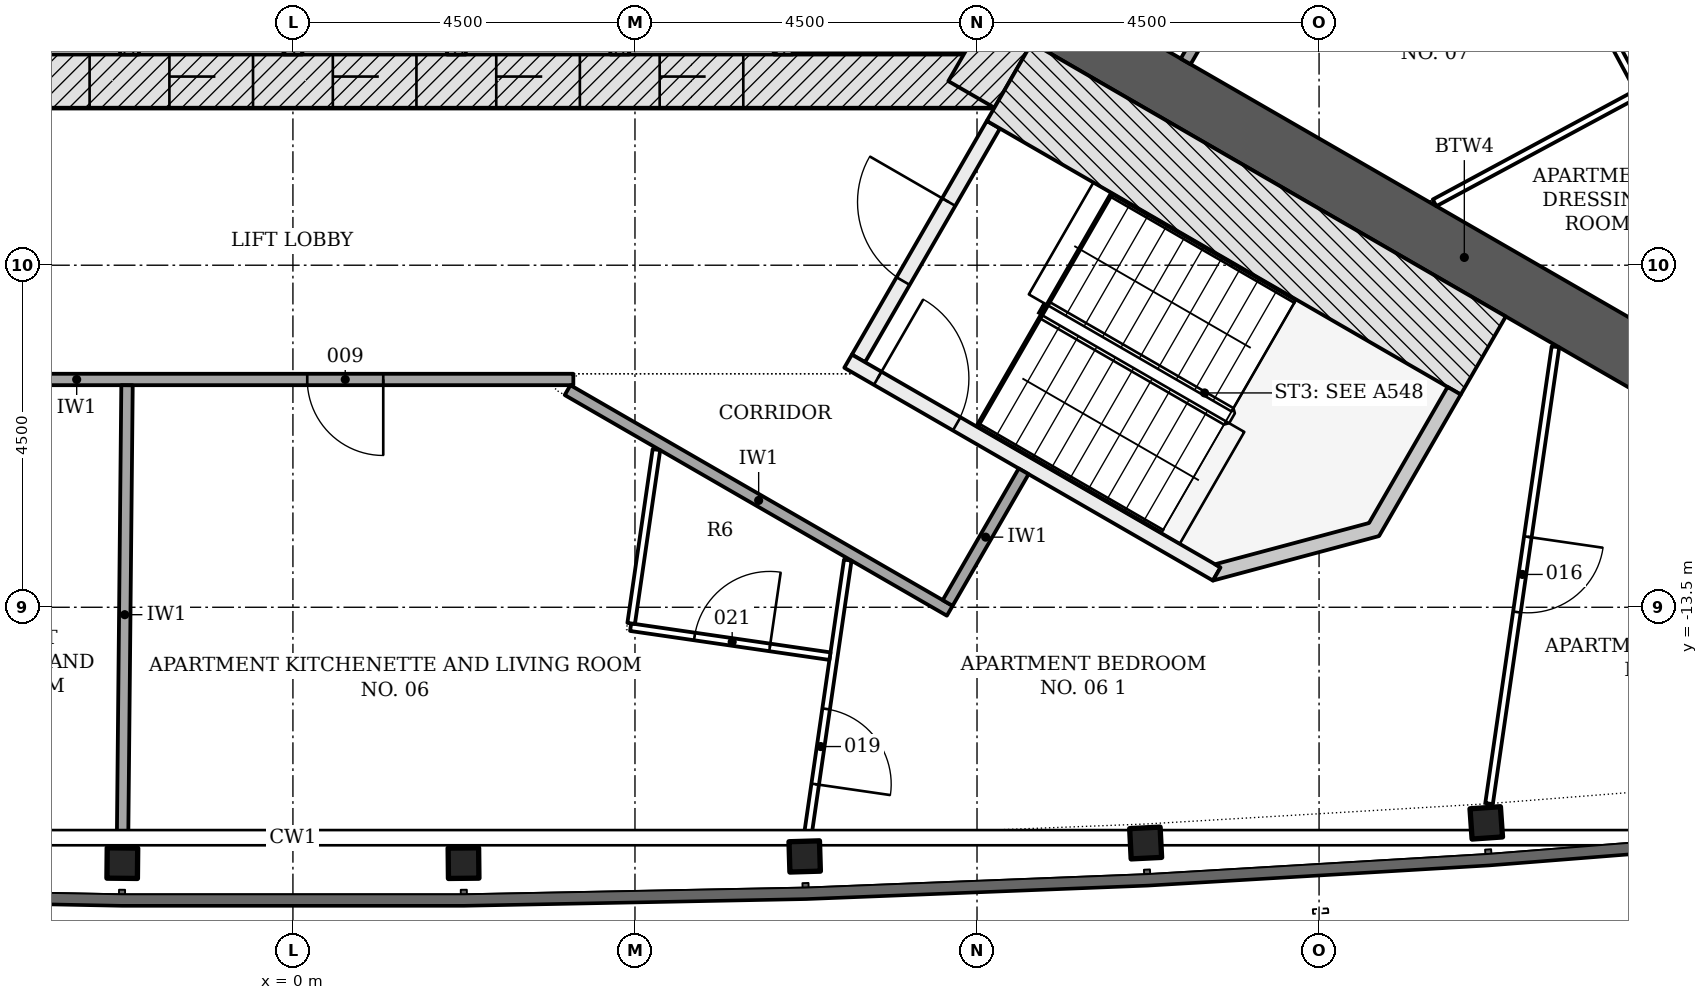
"""IFC4 building model, lengths in metres.
Left out: names, types, materials, properties, quantities, classifications, styles, units other than length and angle.
Written with IfcOpenShell. Run it as: python <this file> out.ifc"""

import sys

from ifc_helpers import new_model, si_unit, direction, frame, frame_2d, origin, origin_2d, place, context, subcontext, project, spatial, polyline, rectangle, i_section, outline, extrude, element, fill, save


model = new_model("IFC4")
c1 = context("Model", 3, precision=1e-05, world=origin(), true_north=direction((0.0, 1.0)))
c2 = subcontext(c1, "Body", "Model", "MODEL_VIEW")
j1 = project(units=[si_unit("LENGTHUNIT", "METRE"), si_unit("PLANEANGLEUNIT", "RADIAN")], contexts=[c1])
p1 = place(None, origin())
s1 = spatial("IfcSite", under=j1, at=p1, CompositionType="ELEMENT")
p2 = place(p1, origin())
s2 = spatial("IfcBuilding", under=s1, at=p2, CompositionType="ELEMENT")
p3 = place(p2, frame((0.0, 0.0, 98.7)))
s3 = spatial("IfcBuildingStorey", under=s2, at=p3, CompositionType="ELEMENT", Elevation=98.7)
p4 = place(p3, frame((-9.229, -6.578, -0.2), z_axis=(0.0, 0.0, 1.0), x_axis=(1.0, 0.0, 0.0)))
e1 = element("IfcWall", 1, at=p4, inside=s3, PredefinedType="SHEAR", context=c2, shape_type="SweptSolid", body=[
    extrude(rectangle(XDim=18.458, YDim=0.7, at=frame_2d((9.229, 0.0))), origin(), (0.0, 0.0, 1.0), 3.6),
])
p5 = place(p4, frame((3.304, 0.0, 0.2)))
e2 = element("IfcOpeningElement", 2, at=p5, cuts=e1, PredefinedType="OPENING", context=c2, shape_type="SweptSolid", body=[
    extrude(rectangle(XDim=1.1, YDim=2.1, at=frame_2d((0.55, 1.05))), frame((0.0, 0.36, 0.0), z_axis=(0.0, -1.0, 0.0), x_axis=(1.0, 0.0, 0.0)), (0.0, 0.0, 1.0), 0.72),
])
p6 = place(p4, frame((5.454, 0.0, 0.2)))
e3 = element("IfcOpeningElement", 3, at=p6, cuts=e1, PredefinedType="OPENING", context=c2, shape_type="SweptSolid", body=[
    extrude(rectangle(XDim=1.1, YDim=2.1, at=frame_2d((0.55, 1.05))), frame((0.0, 0.36, 0.0), z_axis=(0.0, -1.0, 0.0), x_axis=(1.0, 0.0, 0.0)), (0.0, 0.0, 1.0), 0.72),
])
p7 = place(p4, frame((7.604, 0.0, 0.2)))
e4 = element("IfcOpeningElement", 4, at=p7, cuts=e1, PredefinedType="OPENING", context=c2, shape_type="SweptSolid", body=[
    extrude(rectangle(XDim=1.1, YDim=2.1, at=frame_2d((0.55, 1.05))), frame((0.0, 0.36, 0.0), z_axis=(0.0, -1.0, 0.0), x_axis=(1.0, 0.0, 0.0)), (0.0, 0.0, 1.0), 0.72),
])
p8 = place(p4, frame((9.754, 0.0, 0.2)))
e5 = element("IfcOpeningElement", 5, at=p8, cuts=e1, PredefinedType="OPENING", context=c2, shape_type="SweptSolid", body=[
    extrude(rectangle(XDim=1.1, YDim=2.1, at=frame_2d((0.55, 1.05))), frame((0.0, 0.36, 0.0), z_axis=(0.0, -1.0, 0.0), x_axis=(1.0, 0.0, 0.0)), (0.0, 0.0, 1.0), 0.72),
])
p9 = place(p4, frame((11.904, 0.0, 0.2)))
e6 = element("IfcOpeningElement", 6, at=p9, cuts=e1, PredefinedType="OPENING", context=c2, shape_type="SweptSolid", body=[
    extrude(rectangle(XDim=1.1, YDim=2.1, at=frame_2d((0.55, 1.05))), frame((0.0, 0.36, 0.0), z_axis=(0.0, -1.0, 0.0), x_axis=(1.0, 0.0, 0.0)), (0.0, 0.0, 1.0), 0.72),
])
p10 = place(p4, frame((14.054, 0.0, 0.2)))
e7 = element("IfcOpeningElement", 7, at=p10, cuts=e1, PredefinedType="OPENING", context=c2, shape_type="SweptSolid", body=[
    extrude(rectangle(XDim=1.1, YDim=2.1, at=frame_2d((0.55, 1.05))), frame((0.0, 0.36, 0.0), z_axis=(0.0, -1.0, 0.0), x_axis=(1.0, 0.0, 0.0)), (0.0, 0.0, 1.0), 0.72),
])
p11 = place(p4, frame((1.079, 0.0, 0.2)))
e8 = element("IfcOpeningElement", 8, at=p11, cuts=e1, PredefinedType="OPENING", context=c2, shape_type="SweptSolid", body=[
    extrude(rectangle(XDim=0.9, YDim=2.1, at=frame_2d((0.45, 1.05))), frame((0.0, 0.36, 0.0), z_axis=(0.0, -1.0, 0.0), x_axis=(1.0, 0.0, 0.0)), (0.0, 0.0, 1.0), 0.72),
])
p12 = place(p3, frame((8.926, -6.753, -0.2), z_axis=(0.0, 0.0, 1.0), x_axis=(0.500042739161, 0.866000726912, 0.0)))
e9 = element("IfcWall", 9, at=p12, inside=s3, PredefinedType="SHEAR", context=c2, shape_type="SweptSolid", body=[
    extrude(rectangle(XDim=2.771, YDim=0.7, at=frame_2d((1.386, 0.0))), origin(), (0.0, 0.0, 1.0), 3.6),
])
p13 = place(p3, frame((9.922, -5.728, -0.2), z_axis=(0.0, 0.0, 1.0), x_axis=(0.866029086277, -0.499993621681, 0.0)))
e10 = element("IfcWall", 10, at=p13, inside=s3, PredefinedType="SHEAR", context=c2, shape_type="SweptSolid", body=[
    extrude(rectangle(XDim=12.677, YDim=0.8, at=frame_2d((6.339, 0.0))), origin(), (0.0, 0.0, 1.0), 3.6),
])
for number, where, z_axis, x_axis in (
    (11, (-2.245, -16.866, -0.2), (0.0, 0.0, 1.0), (1.0, -0.01, 0.0)),
    (12, (2.245, -16.866, -0.2), (0.0, 0.0, 1.0), (1.0, 0.01, 0.0)),
    (13, (6.733, -16.778, -0.2), (0.0, 0.0, 1.0), (1.0, 0.03, 0.0)),
    (14, (11.219, -16.601, -0.2), (0.0, 0.0, 1.0), (0.999, 0.049, 0.0)),
    (15, (15.7, -16.336, -0.2), (0.0, 0.0, 1.0), (0.998, 0.069, 0.0)),
):
    element("IfcColumn", number, at=place(p3, frame(where, z_axis=z_axis, x_axis=x_axis)), inside=s3, PredefinedType="COLUMN", context=c2, shape_type="SweptSolid", body=[
        extrude(i_section(OverallWidth=0.401, OverallDepth=0.399, WebThickness=0.025, FlangeThickness=0.04, FilletRadius=0.015, at=origin_2d()), origin(), (0.0, 0.0, 1.0), 3.6),
    ])
for number, where, z_axis, x_axis in (
    (16, (-2.15, -6.228, -0.2), (0.0, 0.0, 1.0), (0.0, 1.0, 0.0)),
    (17, (0.0, -6.228, -0.2), (0.0, 0.0, 1.0), (0.0, 1.0, 0.0)),
    (18, (2.15, -6.228, -0.2), (0.0, 0.0, 1.0), (0.0, 1.0, 0.0)),
    (19, (4.3, -6.228, -0.2), (0.0, 0.0, 1.0), (0.0, 1.0, 0.0)),
    (20, (6.45, -6.228, -0.2), (0.0, 0.0, 1.0), (0.0, 1.0, 0.0)),
):
    element("IfcWall", number, at=place(p3, frame(where, z_axis=z_axis, x_axis=x_axis)), inside=s3, PredefinedType="PARTITIONING", context=c2, shape_type="SweptSolid", body=[
        extrude(rectangle(XDim=2.5, YDim=0.25, at=frame_2d((1.25, 0.0))), origin(), (0.0, 0.0, 1.0), 3.6),
    ])
p14 = place(p3, frame((7.44, -10.226, -0.2), z_axis=(0.0, 0.0, 1.0), x_axis=(0.500022077904, 0.866012656725, 0.0)))
e21 = element("IfcWall", 21, at=p14, inside=s3, PredefinedType="SHEAR", context=c2, shape_type="SweptSolid", body=[
    extrude(rectangle(XDim=3.55, YDim=0.2, at=frame_2d((1.775, 0.0))), origin(), (0.0, 0.0, 1.0), 3.6),
])
p15 = place(p14, frame((1.175, 0.0, 0.2)))
e22 = element("IfcOpeningElement", 22, at=p15, cuts=e21, PredefinedType="OPENING", context=c2, shape_type="SweptSolid", body=[
    extrude(rectangle(XDim=1.2, YDim=2.1, at=frame_2d((0.6, 1.05))), frame((0.0, 0.11, 0.0), z_axis=(0.0, -1.0, 0.0), x_axis=(1.0, 0.0, 0.0)), (0.0, 0.0, 1.0), 0.22),
])
p16 = place(p3, frame((7.304, -10.262, -0.2), z_axis=(0.0, 0.0, 1.0), x_axis=(0.866026594901, -0.49999793692, 0.0)))
e23 = element("IfcWall", 23, at=p16, inside=s3, PredefinedType="SHEAR", context=c2, shape_type="SweptSolid", body=[
    extrude(rectangle(XDim=5.6, YDim=0.2, at=frame_2d((2.8, 0.0))), origin(), (0.0, 0.0, 1.0), 3.6),
])
p17 = place(p16, frame((0.45, 0.0, 0.2)))
e24 = element("IfcOpeningElement", 24, at=p17, cuts=e23, PredefinedType="OPENING", context=c2, shape_type="SweptSolid", body=[
    extrude(rectangle(XDim=1.2, YDim=2.1, at=frame_2d((0.6, 1.05))), frame((0.0, 0.11, 0.0), z_axis=(0.0, -1.0, 0.0), x_axis=(1.0, 0.0, 0.0)), (0.0, 0.0, 1.0), 0.22),
])
p18 = place(p3, frame((9.425, -6.588, -0.2), z_axis=(0.0, 0.0, 1.0), x_axis=(0.866018442252, -0.500012057535, 0.0)))
e25 = element("IfcWall", 25, at=p18, inside=s3, PredefinedType="SHEAR", context=c2, shape_type="SweptSolid", body=[
    extrude(rectangle(XDim=7.2, YDim=1.186, at=frame_2d((3.6, 0.0))), origin(), (0.0, 0.0, 1.0), 3.6),
])
p19 = place(p3, frame((0.0, 0.0, -0.2)))
e26 = element("IfcWall", 26, at=p19, inside=s3, PredefinedType="SHEAR", context=c2, shape_type="SweptSolid", body=[
    extrude(outline(polyline([(12.104, -13.149), (14.289, -12.563), (15.364, -10.701), (15.191, -10.601), (14.157, -12.392), (12.132, -12.934), (12.204, -12.976), (12.204, -12.976), (12.204, -12.976), (12.204, -12.976), (12.204, -12.976), (12.204, -12.976), (12.204, -12.976), (12.204, -12.976), (12.204, -12.976), (12.204, -12.976), (12.204, -12.976), (12.204, -12.976), (12.204, -12.976), (12.204, -12.976), (12.204, -12.976), (12.204, -12.976), (12.204, -12.976), (12.104, -13.149)])), origin(), (0.0, 0.0, 1.0), 3.6),
])
p20 = place(p3, frame((3.689, -10.503, 0.0), z_axis=(0.0, 0.0, 1.0), x_axis=(-1.0, 0.0, 0.0)))
e27 = element("IfcWall", 27, at=p20, inside=s3, PredefinedType="PARTITIONING", context=c2, shape_type="SweptSolid", body=[
    extrude(rectangle(XDim=13.068, YDim=0.15, at=frame_2d((6.534, 0.0))), origin(), (0.0, 0.0, 1.0), 2.778),
])
p21 = place(p20, frame((7.568, 0.0, 0.0)))
e28 = element("IfcOpeningElement", 28, at=p21, cuts=e27, PredefinedType="OPENING", context=c2, shape_type="SweptSolid", body=[
    extrude(rectangle(XDim=1.0, YDim=2.1, at=frame_2d((0.5, 1.05))), frame((0.0, 0.085, 0.0), z_axis=(0.0, -1.0, 0.0), x_axis=(1.0, 0.0, 0.0)), (0.0, 0.0, 1.0), 0.17),
])
p22 = place(p20, frame((2.501, 0.0, 0.0)))
e29 = element("IfcOpeningElement", 29, at=p22, cuts=e27, PredefinedType="OPENING", context=c2, shape_type="SweptSolid", body=[
    extrude(rectangle(XDim=1.0, YDim=2.1, at=frame_2d((0.5, 1.05))), frame((0.0, 0.085, 0.0), z_axis=(0.0, -1.0, 0.0), x_axis=(1.0, 0.0, 0.0)), (0.0, 0.0, 1.0), 0.17),
])
p23 = place(p3, frame((3.613, -10.643, 0.0), z_axis=(0.0, 0.0, 1.0), x_axis=(0.866042728627, -0.499969991291, 0.0)))
e30 = element("IfcWall", 30, at=p23, inside=s3, PredefinedType="PARTITIONING", context=c2, shape_type="SweptSolid", body=[
    extrude(rectangle(XDim=5.805, YDim=0.15, at=frame_2d((2.903, 0.0))), origin(), (0.0, 0.0, 1.0), 2.778),
])
p24 = place(p3, frame((8.614, -13.444, 0.0), z_axis=(0.0, 0.0, 1.0), x_axis=(0.499972520799, 0.866041268327, 0.0)))
e31 = element("IfcWall", 31, at=p24, inside=s3, PredefinedType="PARTITIONING", context=c2, shape_type="SweptSolid", body=[
    extrude(rectangle(XDim=2.0, YDim=0.15, at=frame_2d((1.0, 0.0))), origin(), (0.0, 0.0, 1.0), 3.4),
])
p25 = place(p3, frame((11.745, -6.319, 0.0), z_axis=(0.0, 0.0, 1.0), x_axis=(0.500012721296, 0.866018059016, 0.0)))
e32 = element("IfcWall", 32, at=p25, inside=s3, PredefinedType="PARTITIONING", context=c2, shape_type="SweptSolid", body=[
    extrude(rectangle(XDim=1.966, YDim=0.15, at=frame_2d((0.983, 0.0))), origin(), (0.0, 0.0, 1.0), 2.778),
])
p26 = place(p3, frame((-2.242, -16.616, 0.0), z_axis=(0.0, 0.0, 1.0), x_axis=(0.009866078621, 0.999951329062, 0.0)))
e33 = element("IfcWall", 33, at=p26, inside=s3, PredefinedType="PARTITIONING", context=c2, shape_type="SweptSolid", body=[
    extrude(rectangle(XDim=6.038, YDim=0.15, at=frame_2d((3.019, 0.0))), origin(), (0.0, 0.0, 1.0), 2.778),
])
p27 = place(p3, frame((20.073, -11.078, 0.0), z_axis=(0.0, 0.0, 1.0), x_axis=(-0.474207115322, 0.880413318719, 0.0)))
e34 = element("IfcWall", 34, at=p27, inside=s3, PredefinedType="PARTITIONING", context=c2, shape_type="SweptSolid", body=[
    extrude(rectangle(XDim=8.548, YDim=0.1, at=frame_2d((4.274, 0.0))), origin(), (0.0, 0.0, 1.0), 2.778),
])
p28 = place(p27, frame((1.949, 0.0, 0.0)))
e35 = element("IfcOpeningElement", 35, at=p28, cuts=e34, PredefinedType="OPENING", context=c2, shape_type="SweptSolid", body=[
    extrude(rectangle(XDim=1.0, YDim=2.1, at=frame_2d((0.5, 1.05))), frame((0.0, 0.06, 0.0), z_axis=(0.0, -1.0, 0.0), x_axis=(1.0, 0.0, 0.0)), (0.0, 0.0, 1.0), 0.12),
])
p29 = place(p3, frame((16.61, -10.073, 0.0), z_axis=(0.0, 0.0, 1.0), x_axis=(-0.143841065588, -0.989600802269, 0.0)))
e36 = element("IfcWall", 36, at=p29, inside=s3, PredefinedType="PARTITIONING", context=c2, shape_type="SweptSolid", body=[
    extrude(rectangle(XDim=6.073, YDim=0.1, at=frame_2d((3.037, 0.0))), origin(), (0.0, 0.0, 1.0), 2.923),
])
p30 = place(p29, frame((2.526, 0.0, 0.0)))
e37 = element("IfcOpeningElement", 37, at=p30, cuts=e36, PredefinedType="OPENING", context=c2, shape_type="SweptSolid", body=[
    extrude(rectangle(XDim=1.0, YDim=2.1, at=frame_2d((0.5, 1.05))), frame((0.0, 0.06, 0.0), z_axis=(0.0, -1.0, 0.0), x_axis=(1.0, 0.0, 0.0)), (0.0, 0.0, 1.0), 0.12),
])
p31 = place(p3, frame((7.3, -12.879, 0.0), z_axis=(0.0, 0.0, 1.0), x_axis=(-0.14388794615, -0.989593986922, 0.0)))
e38 = element("IfcWall", 38, at=p31, inside=s3, PredefinedType="PARTITIONING", context=c2, shape_type="SweptSolid", body=[
    extrude(rectangle(XDim=3.685, YDim=0.1, at=frame_2d((1.843, 0.0))), origin(), (0.0, 0.0, 1.0), 2.778),
])
p32 = place(p31, frame((1.979, 0.0, 0.0)))
e39 = element("IfcOpeningElement", 39, at=p32, cuts=e38, PredefinedType="OPENING", context=c2, shape_type="SweptSolid", body=[
    extrude(rectangle(XDim=1.0, YDim=2.1, at=frame_2d((0.5, 1.05))), frame((0.0, 0.06, 0.0), z_axis=(0.0, -1.0, 0.0), x_axis=(1.0, 0.0, 0.0)), (0.0, 0.0, 1.0), 0.12),
])
p33 = place(p3, frame((17.682, -6.745, 0.0), z_axis=(0.0, 0.0, 1.0), x_axis=(-0.880419251007, -0.474196101267, 0.0)))
e40 = element("IfcWall", 40, at=p33, inside=s3, PredefinedType="PARTITIONING", context=c2, shape_type="SweptSolid", body=[
    extrude(rectangle(XDim=3.024, YDim=0.1, at=frame_2d((1.512, 0.0))), origin(), (0.0, 0.0, 1.0), 3.4),
])
p34 = place(p3, frame((4.443, -13.762, 0.0), z_axis=(0.0, 0.0, 1.0), x_axis=(0.989603850573, -0.143820092239, 0.0)))
e41 = element("IfcWall", 41, at=p34, inside=s3, PredefinedType="PARTITIONING", context=c2, shape_type="SweptSolid", body=[
    extrude(rectangle(XDim=2.65, YDim=0.1, at=frame_2d((1.325, 0.0))), origin(), (0.0, 0.0, 1.0), 2.778),
])
p35 = place(p34, frame((0.85, 0.0, 0.0)))
e42 = element("IfcOpeningElement", 42, at=p35, cuts=e41, PredefinedType="OPENING", context=c2, shape_type="SweptSolid", body=[
    extrude(rectangle(XDim=1.0, YDim=2.1, at=frame_2d((0.5, 1.05))), frame((0.0, 0.06, 0.0), z_axis=(0.0, -1.0, 0.0), x_axis=(1.0, 0.0, 0.0)), (0.0, 0.0, 1.0), 0.12),
])
p36 = place(p3, frame((4.782, -11.426, 0.0), z_axis=(0.0, 0.0, 1.0), x_axis=(-0.14392103122, -0.989589175756, 0.0)))
e43 = element("IfcWall", 43, at=p36, inside=s3, PredefinedType="PARTITIONING", context=c2, shape_type="SweptSolid", body=[
    extrude(rectangle(XDim=2.311, YDim=0.1, at=frame_2d((1.155, 0.0))), origin(), (0.0, 0.0, 1.0), 3.4),
])
p37 = place(p6, origin())
e44 = element("IfcDoor", 44, at=p37, inside=s3, OperationType="DOUBLE_DOOR_SLIDING", PredefinedType="DOOR", context=c2, shape_type="SweptSolid", body=[
    extrude(rectangle(XDim=1.1, YDim=2.1, at=frame_2d((0.55, 1.05))), frame((0.0, 0.025, 0.0), z_axis=(0.0, -1.0, 0.0), x_axis=(1.0, 0.0, 0.0)), (0.0, 0.0, 1.0), 0.05),
])
fill(e3, e44)
p38 = place(p7, origin())
e45 = element("IfcDoor", 45, at=p38, inside=s3, OperationType="DOUBLE_DOOR_SLIDING", PredefinedType="DOOR", context=c2, shape_type="SweptSolid", body=[
    extrude(rectangle(XDim=1.1, YDim=2.1, at=frame_2d((0.55, 1.05))), frame((0.0, 0.025, 0.0), z_axis=(0.0, -1.0, 0.0), x_axis=(1.0, 0.0, 0.0)), (0.0, 0.0, 1.0), 0.05),
])
fill(e4, e45)
p39 = place(p8, origin())
e46 = element("IfcDoor", 46, at=p39, inside=s3, OperationType="DOUBLE_DOOR_SLIDING", PredefinedType="DOOR", context=c2, shape_type="SweptSolid", body=[
    extrude(rectangle(XDim=1.1, YDim=2.1, at=frame_2d((0.55, 1.05))), frame((0.0, 0.025, 0.0), z_axis=(0.0, -1.0, 0.0), x_axis=(1.0, 0.0, 0.0)), (0.0, 0.0, 1.0), 0.05),
])
fill(e5, e46)
p40 = place(p9, origin())
e47 = element("IfcDoor", 47, at=p40, inside=s3, OperationType="DOUBLE_DOOR_SLIDING", PredefinedType="DOOR", context=c2, shape_type="SweptSolid", body=[
    extrude(rectangle(XDim=1.1, YDim=2.1, at=frame_2d((0.55, 1.05))), frame((0.0, 0.025, 0.0), z_axis=(0.0, -1.0, 0.0), x_axis=(1.0, 0.0, 0.0)), (0.0, 0.0, 1.0), 0.05),
])
fill(e6, e47)
p41 = place(p10, origin())
e48 = element("IfcDoor", 48, at=p41, inside=s3, OperationType="DOUBLE_DOOR_SLIDING", PredefinedType="DOOR", context=c2, shape_type="SweptSolid", body=[
    extrude(rectangle(XDim=1.1, YDim=2.1, at=frame_2d((0.55, 1.05))), frame((0.0, 0.025, 0.0), z_axis=(0.0, -1.0, 0.0), x_axis=(1.0, 0.0, 0.0)), (0.0, 0.0, 1.0), 0.05),
])
fill(e7, e48)
p42 = place(p15, origin())
e49 = element("IfcDoor", 49, at=p42, inside=s3, OperationType="SINGLE_SWING_RIGHT", PredefinedType="DOOR", context=c2, shape_type="SweptSolid", body=[
    extrude(rectangle(XDim=1.2, YDim=2.1, at=frame_2d((0.6, 1.05))), frame((0.0, 0.025, 0.0), z_axis=(0.0, -1.0, 0.0), x_axis=(1.0, 0.0, 0.0)), (0.0, 0.0, 1.0), 0.05),
])
fill(e22, e49)
p43 = place(p17, origin())
e50 = element("IfcDoor", 50, at=p43, inside=s3, OperationType="SINGLE_SWING_LEFT", PredefinedType="DOOR", context=c2, shape_type="SweptSolid", body=[
    extrude(rectangle(XDim=1.2, YDim=2.1, at=frame_2d((0.6, 1.05))), frame((0.0, 0.025, 0.0), z_axis=(0.0, -1.0, 0.0), x_axis=(1.0, 0.0, 0.0)), (0.0, 0.0, 1.0), 0.05),
])
fill(e24, e50)
p44 = place(p22, origin())
e51 = element("IfcDoor", 51, at=p44, inside=s3, OperationType="SINGLE_SWING_LEFT", PredefinedType="DOOR", context=c2, shape_type="SweptSolid", body=[
    extrude(rectangle(XDim=1.0, YDim=2.1, at=frame_2d((0.5, 1.05))), frame((0.0, 0.025, 0.0), z_axis=(0.0, -1.0, 0.0), x_axis=(1.0, 0.0, 0.0)), (0.0, 0.0, 1.0), 0.05),
])
fill(e29, e51)
p45 = place(p30, origin())
e52 = element("IfcDoor", 52, at=p45, inside=s3, OperationType="SINGLE_SWING_LEFT", PredefinedType="DOOR", context=c2, shape_type="SweptSolid", body=[
    extrude(rectangle(XDim=1.0, YDim=2.1, at=frame_2d((0.5, 1.05))), frame((0.0, 0.025, 0.0), z_axis=(0.0, -1.0, 0.0), x_axis=(1.0, 0.0, 0.0)), (0.0, 0.0, 1.0), 0.05),
])
fill(e37, e52)
p46 = place(p32, origin())
e53 = element("IfcDoor", 53, at=p46, inside=s3, OperationType="SINGLE_SWING_RIGHT", PredefinedType="DOOR", context=c2, shape_type="SweptSolid", body=[
    extrude(rectangle(XDim=1.0, YDim=2.1, at=frame_2d((0.5, 1.05))), frame((0.0, 0.025, 0.0), z_axis=(0.0, -1.0, 0.0), x_axis=(1.0, 0.0, 0.0)), (0.0, 0.0, 1.0), 0.05),
])
fill(e39, e53)
p47 = place(p35, origin())
e54 = element("IfcDoor", 54, at=p47, inside=s3, OperationType="SINGLE_SWING_RIGHT", PredefinedType="DOOR", context=c2, shape_type="SweptSolid", body=[
    extrude(rectangle(XDim=1.0, YDim=2.1, at=frame_2d((0.5, 1.05))), frame((0.0, 0.025, 0.0), z_axis=(0.0, -1.0, 0.0), x_axis=(1.0, 0.0, 0.0)), (0.0, 0.0, 1.0), 0.05),
])
fill(e42, e54)
save(model, sys.argv[1])
